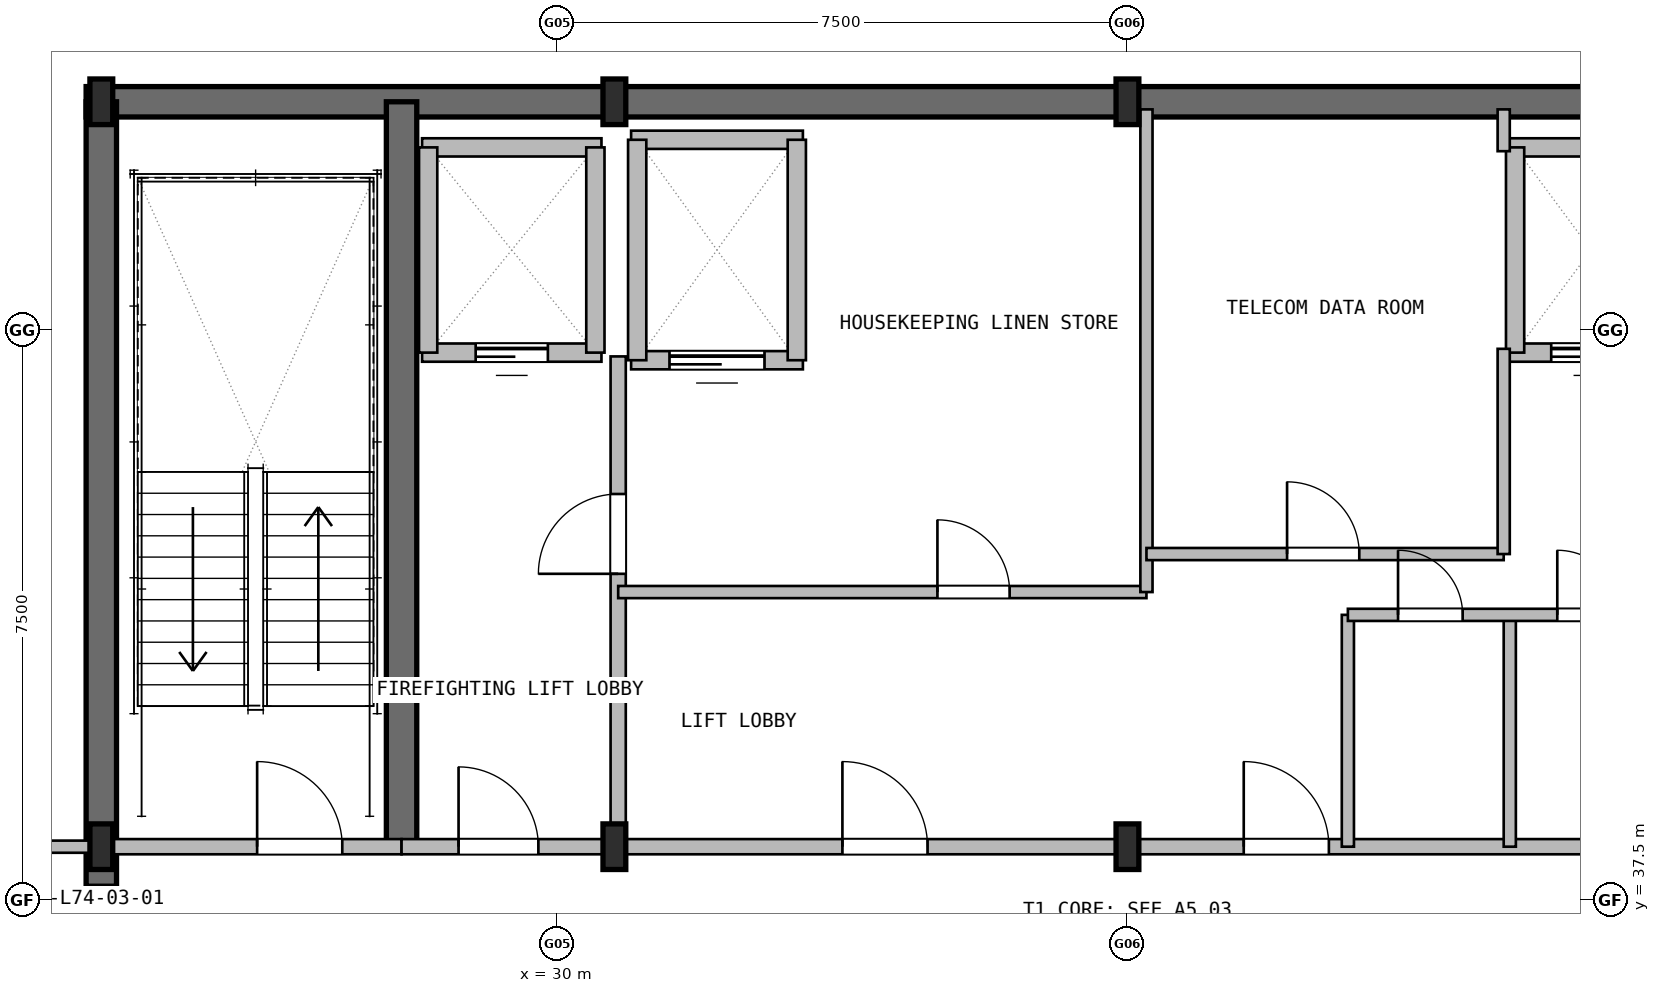
"""IFC4 building model, lengths in metres.
Left out: names, types, materials, properties, quantities, classifications, styles, units other than length and angle.
Written with IfcOpenShell. Run it as: python <this file> out.ifc"""

import sys

from ifc_helpers import new_model, si_unit, direction, frame, frame_2d, origin, origin_2d, place, context, subcontext, project, spatial, rectangle, i_section, extrude, element, fill, save


model = new_model("IFC4")
c1 = context("Model", 3, precision=1e-05, world=origin(), true_north=direction((0.0, 1.0)))
c2 = subcontext(c1, "Body", "Model", "MODEL_VIEW")
j1 = project(units=[si_unit("LENGTHUNIT", "METRE"), si_unit("PLANEANGLEUNIT", "RADIAN")], contexts=[c1])
p1 = place(None, origin())
s1 = spatial("IfcSite", under=j1, at=p1, CompositionType="ELEMENT")
p2 = place(p1, origin())
s2 = spatial("IfcBuilding", under=s1, at=p2, CompositionType="ELEMENT")
p3 = place(p2, frame((0.0, 0.0, 265.8)))
s3 = spatial("IfcBuildingStorey", under=s2, at=p3, CompositionType="ELEMENT", Elevation=265.8)
p4 = place(p3, frame((23.8, 48.0, 0.0), z_axis=(0.0, 0.0, 1.0), x_axis=(1.0, 0.0, 0.0)))
e1 = element("IfcWall", 1, at=p4, inside=s3, PredefinedType="SHEAR", context=c2, shape_type="SweptSolid", body=[
    extrude(rectangle(XDim=27.4, YDim=0.4, at=frame_2d((13.7, 0.0))), origin(), (0.0, 0.0, 1.0), 4.2),
])
p5 = place(p3, frame((24.0, 37.68, 0.0), z_axis=(0.0, 0.0, 1.0), x_axis=(0.0, 1.0, 0.0)))
e2 = element("IfcWall", 2, at=p5, inside=s3, PredefinedType="SHEAR", context=c2, shape_type="SweptSolid", body=[
    extrude(rectangle(XDim=10.32, YDim=0.4, at=frame_2d((5.16, 0.0))), origin(), (0.0, 0.0, 1.0), 4.2),
])
p6 = place(p3, frame((27.95, 38.2, 0.0), z_axis=(0.0, 0.0, 1.0), x_axis=(0.0, 1.0, 0.0)))
e3 = element("IfcWall", 3, at=p6, inside=s3, PredefinedType="SHEAR", context=c2, shape_type="SweptSolid", body=[
    extrude(rectangle(XDim=9.8, YDim=0.4, at=frame_2d((4.9, 0.0))), origin(), (0.0, 0.0, 1.0), 4.2),
])
for number, where, z_axis, x_axis in (
    (4, (24.0, 38.2, 0.0), (0.0, 0.0, 1.0), (1.0, 0.0, 0.0)),
    (5, (24.0, 48.0, 0.0), (0.0, 0.0, 1.0), (1.0, 0.0, 0.0)),
    (6, (30.75, 38.2, 0.0), (0.0, 0.0, 1.0), (1.0, 0.0, 0.0)),
    (7, (30.75, 48.0, 0.0), (0.0, 0.0, 1.0), (1.0, 0.0, 0.0)),
    (8, (37.5, 38.2, 0.0), (0.0, 0.0, 1.0), (1.0, 0.0, 0.0)),
    (9, (37.5, 48.0, 0.0), (0.0, 0.0, 1.0), (1.0, 0.0, 0.0)),
):
    element("IfcColumn", number, at=place(p3, frame(where, z_axis=z_axis, x_axis=x_axis)), inside=s3, PredefinedType="COLUMN", context=c2, shape_type="SweptSolid", body=[
        extrude(i_section(OverallWidth=0.3, OverallDepth=0.6, WebThickness=0.014, FlangeThickness=0.025, at=origin_2d()), origin(), (0.0, 0.0, 1.0), 4.2),
    ])
p7 = place(p3, frame((24.0, 38.2, 0.0), z_axis=(0.0, 0.0, 1.0), x_axis=(1.0, 0.0, 0.0)))
e10 = element("IfcWall", 10, at=p7, inside=s3, PredefinedType="PARTITIONING", context=c2, shape_type="SweptSolid", body=[
    extrude(rectangle(XDim=3.95, YDim=0.2, at=frame_2d((1.975, 0.0))), origin(), (0.0, 0.0, 1.0), 3.33),
])
p8 = place(p7, frame((2.05, 0.0, 0.0)))
e11 = element("IfcOpeningElement", 11, at=p8, cuts=e10, PredefinedType="OPENING", context=c2, shape_type="SweptSolid", body=[
    extrude(rectangle(XDim=1.12, YDim=2.1, at=frame_2d((0.56, 1.05))), frame((0.0, 0.11, 0.0), z_axis=(0.0, -1.0, 0.0), x_axis=(1.0, 0.0, 0.0)), (0.0, 0.0, 1.0), 0.22),
])
p9 = place(p3, frame((30.8, 38.2, 0.0), z_axis=(0.0, 0.0, 1.0), x_axis=(0.0, 1.0, 0.0)))
e12 = element("IfcWall", 12, at=p9, inside=s3, PredefinedType="PARTITIONING", context=c2, shape_type="SweptSolid", body=[
    extrude(rectangle(XDim=6.45, YDim=0.2, at=frame_2d((3.225, 0.0))), origin(), (0.0, 0.0, 1.0), 3.33),
])
p10 = place(p9, frame((3.59, 0.0, 0.0)))
e13 = element("IfcOpeningElement", 13, at=p10, cuts=e12, PredefinedType="OPENING", context=c2, shape_type="SweptSolid", body=[
    extrude(rectangle(XDim=1.05, YDim=2.1, at=frame_2d((0.525, 1.05))), frame((0.0, 0.11, 0.0), z_axis=(0.0, -1.0, 0.0), x_axis=(1.0, 0.0, 0.0)), (0.0, 0.0, 1.0), 0.22),
])
p11 = place(p3, frame((27.95, 38.2, 0.0), z_axis=(0.0, 0.0, 1.0), x_axis=(1.0, 0.0, 0.0)))
e14 = element("IfcWall", 14, at=p11, inside=s3, PredefinedType="PARTITIONING", context=c2, shape_type="SweptSolid", body=[
    extrude(rectangle(XDim=2.85, YDim=0.2, at=frame_2d((1.425, 0.0))), origin(), (0.0, 0.0, 1.0), 3.33),
])
p12 = place(p11, frame((0.75, 0.0, 0.0)))
e15 = element("IfcOpeningElement", 15, at=p12, cuts=e14, PredefinedType="OPENING", context=c2, shape_type="SweptSolid", body=[
    extrude(rectangle(XDim=1.05, YDim=2.1, at=frame_2d((0.525, 1.05))), frame((0.0, 0.11, 0.0), z_axis=(0.0, -1.0, 0.0), x_axis=(1.0, 0.0, 0.0)), (0.0, 0.0, 1.0), 0.22),
])
p13 = place(p3, frame((30.8, 38.2, 0.0), z_axis=(0.0, 0.0, 1.0), x_axis=(1.0, 0.0, 0.0)))
e16 = element("IfcWall", 16, at=p13, inside=s3, PredefinedType="PARTITIONING", context=c2, shape_type="SweptSolid", body=[
    extrude(rectangle(XDim=16.35, YDim=0.2, at=frame_2d((8.175, 0.0))), origin(), (0.0, 0.0, 1.0), 3.33),
])
p14 = place(p13, frame((2.95, 0.0, 0.0)))
e17 = element("IfcOpeningElement", 17, at=p14, cuts=e16, PredefinedType="OPENING", context=c2, shape_type="SweptSolid", body=[
    extrude(rectangle(XDim=1.12, YDim=2.1, at=frame_2d((0.56, 1.05))), frame((0.0, 0.11, 0.0), z_axis=(0.0, -1.0, 0.0), x_axis=(1.0, 0.0, 0.0)), (0.0, 0.0, 1.0), 0.22),
])
p15 = place(p13, frame((8.23, 0.0, 0.0)))
e18 = element("IfcOpeningElement", 18, at=p15, cuts=e16, PredefinedType="OPENING", context=c2, shape_type="SweptSolid", body=[
    extrude(rectangle(XDim=1.12, YDim=2.1, at=frame_2d((0.56, 1.05))), frame((0.0, 0.11, 0.0), z_axis=(0.0, -1.0, 0.0), x_axis=(1.0, 0.0, 0.0)), (0.0, 0.0, 1.0), 0.22),
])
p16 = place(p3, frame((28.22, 44.7, 0.0), z_axis=(0.0, 0.0, 1.0), x_axis=(1.0, 0.0, 0.0)))
e19 = element("IfcWall", 19, at=p16, inside=s3, PredefinedType="PARTITIONING", context=c2, shape_type="SweptSolid", body=[
    extrude(rectangle(XDim=2.36, YDim=0.24, at=frame_2d((1.18, 0.0))), origin(), (0.0, 0.0, 1.0), 3.93),
])
p17 = place(p16, frame((0.705, 0.0, 0.0)))
e20 = element("IfcOpeningElement", 20, at=p17, cuts=e19, PredefinedType="OPENING", context=c2, shape_type="SweptSolid", body=[
    extrude(rectangle(XDim=0.95, YDim=2.15, at=frame_2d((0.475, 1.075))), frame((0.0, 0.13, 0.0), z_axis=(0.0, -1.0, 0.0), x_axis=(1.0, 0.0, 0.0)), (0.0, 0.0, 1.0), 0.26),
])
p18 = place(p3, frame((28.22, 47.4, 0.0), z_axis=(0.0, 0.0, 1.0), x_axis=(1.0, 0.0, 0.0)))
e21 = element("IfcWall", 21, at=p18, inside=s3, PredefinedType="PARTITIONING", context=c2, shape_type="SweptSolid", body=[
    extrude(rectangle(XDim=2.36, YDim=0.24, at=frame_2d((1.18, 0.0))), origin(), (0.0, 0.0, 1.0), 3.93),
])
p19 = place(p3, frame((28.3, 44.7, 0.0), z_axis=(0.0, 0.0, 1.0), x_axis=(0.0, 1.0, 0.0)))
e22 = element("IfcWall", 22, at=p19, inside=s3, PredefinedType="PARTITIONING", context=c2, shape_type="SweptSolid", body=[
    extrude(rectangle(XDim=2.7, YDim=0.24, at=frame_2d((1.35, 0.0))), origin(), (0.0, 0.0, 1.0), 3.93),
])
p20 = place(p3, frame((30.5, 44.7, 0.0), z_axis=(0.0, 0.0, 1.0), x_axis=(0.0, 1.0, 0.0)))
e23 = element("IfcWall", 23, at=p20, inside=s3, PredefinedType="PARTITIONING", context=c2, shape_type="SweptSolid", body=[
    extrude(rectangle(XDim=2.7, YDim=0.24, at=frame_2d((1.35, 0.0))), origin(), (0.0, 0.0, 1.0), 3.33),
])
p21 = place(p3, frame((30.97, 44.6, 0.0), z_axis=(0.0, 0.0, 1.0), x_axis=(1.0, 0.0, 0.0)))
e24 = element("IfcWall", 24, at=p21, inside=s3, PredefinedType="PARTITIONING", context=c2, shape_type="SweptSolid", body=[
    extrude(rectangle(XDim=2.26, YDim=0.24, at=frame_2d((1.13, 0.0))), origin(), (0.0, 0.0, 1.0), 3.93),
])
p22 = place(p21, frame((0.505, 0.0, 0.0)))
e25 = element("IfcOpeningElement", 25, at=p22, cuts=e24, PredefinedType="OPENING", context=c2, shape_type="SweptSolid", body=[
    extrude(rectangle(XDim=1.25, YDim=2.2, at=frame_2d((0.625, 1.1))), frame((0.0, 0.13, 0.0), z_axis=(0.0, -1.0, 0.0), x_axis=(1.0, 0.0, 0.0)), (0.0, 0.0, 1.0), 0.26),
])
p23 = place(p3, frame((30.97, 47.5, 0.0), z_axis=(0.0, 0.0, 1.0), x_axis=(1.0, 0.0, 0.0)))
e26 = element("IfcWall", 26, at=p23, inside=s3, PredefinedType="PARTITIONING", context=c2, shape_type="SweptSolid", body=[
    extrude(rectangle(XDim=2.26, YDim=0.24, at=frame_2d((1.13, 0.0))), origin(), (0.0, 0.0, 1.0), 3.93),
])
for number, where, z_axis, x_axis in (
    (27, (31.05, 44.6, 0.0), (0.0, 0.0, 1.0), (0.0, 1.0, 0.0)),
    (28, (33.15, 44.6, 0.0), (0.0, 0.0, 1.0), (0.0, 1.0, 0.0)),
):
    element("IfcWall", number, at=place(p3, frame(where, z_axis=z_axis, x_axis=x_axis)), inside=s3, PredefinedType="PARTITIONING", context=c2, shape_type="SweptSolid", body=[
        extrude(rectangle(XDim=2.9, YDim=0.24, at=frame_2d((1.45, 0.0))), origin(), (0.0, 0.0, 1.0), 3.93),
    ])
p24 = place(p3, frame((42.52, 44.7, 0.0), z_axis=(0.0, 0.0, 1.0), x_axis=(1.0, 0.0, 0.0)))
e29 = element("IfcWall", 29, at=p24, inside=s3, PredefinedType="PARTITIONING", context=c2, shape_type="SweptSolid", body=[
    extrude(rectangle(XDim=2.16, YDim=0.24, at=frame_2d((1.08, 0.0))), origin(), (0.0, 0.0, 1.0), 3.93),
])
p25 = place(p24, frame((0.555, 0.0, 0.0)))
e30 = element("IfcOpeningElement", 30, at=p25, cuts=e29, PredefinedType="OPENING", context=c2, shape_type="SweptSolid", body=[
    extrude(rectangle(XDim=1.05, YDim=2.15, at=frame_2d((0.525, 1.075))), frame((0.0, 0.13, 0.0), z_axis=(0.0, -1.0, 0.0), x_axis=(1.0, 0.0, 0.0)), (0.0, 0.0, 1.0), 0.26),
])
p26 = place(p3, frame((42.52, 47.4, 0.0), z_axis=(0.0, 0.0, 1.0), x_axis=(1.0, 0.0, 0.0)))
e31 = element("IfcWall", 31, at=p26, inside=s3, PredefinedType="PARTITIONING", context=c2, shape_type="SweptSolid", body=[
    extrude(rectangle(XDim=2.16, YDim=0.24, at=frame_2d((1.08, 0.0))), origin(), (0.0, 0.0, 1.0), 3.93),
])
p27 = place(p3, frame((42.6, 44.7, 0.0), z_axis=(0.0, 0.0, 1.0), x_axis=(0.0, 1.0, 0.0)))
e32 = element("IfcWall", 32, at=p27, inside=s3, PredefinedType="PARTITIONING", context=c2, shape_type="SweptSolid", body=[
    extrude(rectangle(XDim=2.7, YDim=0.24, at=frame_2d((1.35, 0.0))), origin(), (0.0, 0.0, 1.0), 3.93),
])
p28 = place(p3, frame((30.8, 41.55, 0.0), z_axis=(0.0, 0.0, 1.0), x_axis=(1.0, 0.0, 0.0)))
e33 = element("IfcWall", 33, at=p28, inside=s3, PredefinedType="PARTITIONING", context=c2, shape_type="SweptSolid", body=[
    extrude(rectangle(XDim=6.95, YDim=0.16, at=frame_2d((3.475, 0.0))), origin(), (0.0, 0.0, 1.0), 3.93),
])
p29 = place(p28, frame((4.2, 0.0, 0.0)))
e34 = element("IfcOpeningElement", 34, at=p29, cuts=e33, PredefinedType="OPENING", context=c2, shape_type="SweptSolid", body=[
    extrude(rectangle(XDim=0.95, YDim=2.1, at=frame_2d((0.475, 1.05))), frame((0.0, 0.09, 0.0), z_axis=(0.0, -1.0, 0.0), x_axis=(1.0, 0.0, 0.0)), (0.0, 0.0, 1.0), 0.18),
])
p30 = place(p3, frame((37.75, 41.55, 0.0), z_axis=(0.0, 0.0, 1.0), x_axis=(0.0, 1.0, 0.0)))
e35 = element("IfcWall", 35, at=p30, inside=s3, PredefinedType="PARTITIONING", context=c2, shape_type="SweptSolid", body=[
    extrude(rectangle(XDim=6.35, YDim=0.16, at=frame_2d((3.175, 0.0))), origin(), (0.0, 0.0, 1.0), 3.93),
])
p31 = place(p3, frame((37.75, 42.05, 0.0), z_axis=(0.0, 0.0, 1.0), x_axis=(1.0, 0.0, 0.0)))
e36 = element("IfcWall", 36, at=p31, inside=s3, PredefinedType="PARTITIONING", context=c2, shape_type="SweptSolid", body=[
    extrude(rectangle(XDim=4.7, YDim=0.16, at=frame_2d((2.35, 0.0))), origin(), (0.0, 0.0, 1.0), 3.93),
])
p32 = place(p31, frame((1.85, 0.0, 0.0)))
e37 = element("IfcOpeningElement", 37, at=p32, cuts=e36, PredefinedType="OPENING", context=c2, shape_type="SweptSolid", body=[
    extrude(rectangle(XDim=0.95, YDim=2.1, at=frame_2d((0.475, 1.05))), frame((0.0, 0.09, 0.0), z_axis=(0.0, -1.0, 0.0), x_axis=(1.0, 0.0, 0.0)), (0.0, 0.0, 1.0), 0.18),
])
p33 = place(p3, frame((42.45, 42.05, 0.0), z_axis=(0.0, 0.0, 1.0), x_axis=(0.0, 1.0, 0.0)))
e38 = element("IfcWall", 38, at=p33, inside=s3, PredefinedType="PARTITIONING", context=c2, shape_type="SweptSolid", body=[
    extrude(rectangle(XDim=2.7, YDim=0.16, at=frame_2d((1.35, 0.0))), origin(), (0.0, 0.0, 1.0), 3.93),
])
p34 = place(p3, frame((42.45, 47.35, 0.0), z_axis=(0.0, 0.0, 1.0), x_axis=(0.0, 1.0, 0.0)))
e39 = element("IfcWall", 39, at=p34, inside=s3, PredefinedType="PARTITIONING", context=c2, shape_type="SweptSolid", body=[
    extrude(rectangle(XDim=0.55, YDim=0.16, at=frame_2d((0.275, 0.0))), origin(), (0.0, 0.0, 1.0), 3.93),
])
for number, where, z_axis, x_axis in (
    (40, (40.4, 38.2, 0.0), (0.0, 0.0, 1.0), (0.0, 1.0, 0.0)),
    (41, (42.53, 38.2, 0.0), (0.0, 0.0, 1.0), (0.0, 1.0, 0.0)),
):
    element("IfcWall", number, at=place(p3, frame(where, z_axis=z_axis, x_axis=x_axis)), inside=s3, PredefinedType="PARTITIONING", context=c2, shape_type="SweptSolid", body=[
        extrude(rectangle(XDim=3.05, YDim=0.16, at=frame_2d((1.525, 0.0))), origin(), (0.0, 0.0, 1.0), 3.93),
    ])
p35 = place(p3, frame((40.4, 41.25, 0.0), z_axis=(0.0, 0.0, 1.0), x_axis=(1.0, 0.0, 0.0)))
e42 = element("IfcWall", 42, at=p35, inside=s3, PredefinedType="PARTITIONING", context=c2, shape_type="SweptSolid", body=[
    extrude(rectangle(XDim=6.75, YDim=0.16, at=frame_2d((3.375, 0.0))), origin(), (0.0, 0.0, 1.0), 3.93),
])
p36 = place(p35, frame((0.66, 0.0, 0.0)))
e43 = element("IfcOpeningElement", 43, at=p36, cuts=e42, PredefinedType="OPENING", context=c2, shape_type="SweptSolid", body=[
    extrude(rectangle(XDim=0.85, YDim=2.05, at=frame_2d((0.425, 1.025))), frame((0.0, 0.09, 0.0), z_axis=(0.0, -1.0, 0.0), x_axis=(1.0, 0.0, 0.0)), (0.0, 0.0, 1.0), 0.18),
])
p37 = place(p35, frame((2.755, 0.0, 0.0)))
e44 = element("IfcOpeningElement", 44, at=p37, cuts=e42, PredefinedType="OPENING", context=c2, shape_type="SweptSolid", body=[
    extrude(rectangle(XDim=0.85, YDim=2.05, at=frame_2d((0.425, 1.025))), frame((0.0, 0.09, 0.0), z_axis=(0.0, -1.0, 0.0), x_axis=(1.0, 0.0, 0.0)), (0.0, 0.0, 1.0), 0.18),
])
p38 = place(p35, frame((4.83, 0.0, 0.0)))
e45 = element("IfcOpeningElement", 45, at=p38, cuts=e42, PredefinedType="OPENING", context=c2, shape_type="SweptSolid", body=[
    extrude(rectangle(XDim=0.85, YDim=2.05, at=frame_2d((0.425, 1.025))), frame((0.0, 0.09, 0.0), z_axis=(0.0, -1.0, 0.0), x_axis=(1.0, 0.0, 0.0)), (0.0, 0.0, 1.0), 0.18),
])
p39 = place(p3, frame((22.6, 38.2, 0.0), z_axis=(0.0, 0.0, 1.0), x_axis=(1.0, 0.0, 0.0)))
e46 = element("IfcWall", 46, at=p39, inside=s3, PredefinedType="PARTITIONING", context=c2, shape_type="SweptSolid", body=[
    extrude(rectangle(XDim=1.4, YDim=0.16, at=frame_2d((0.7, 0.0))), origin(), (0.0, 0.0, 1.0), 3.33),
])
p40 = place(p8, origin())
e47 = element("IfcDoor", 47, at=p40, inside=s3, OperationType="SINGLE_SWING_RIGHT", PredefinedType="DOOR", context=c2, shape_type="SweptSolid", body=[
    extrude(rectangle(XDim=1.12, YDim=2.1, at=frame_2d((0.56, 1.05))), frame((0.0, 0.025, 0.0), z_axis=(0.0, -1.0, 0.0), x_axis=(1.0, 0.0, 0.0)), (0.0, 0.0, 1.0), 0.05),
])
fill(e11, e47)
p41 = place(p10, origin())
e48 = element("IfcDoor", 48, at=p41, inside=s3, OperationType="SINGLE_SWING_RIGHT", PredefinedType="DOOR", context=c2, shape_type="SweptSolid", body=[
    extrude(rectangle(XDim=1.05, YDim=2.1, at=frame_2d((0.525, 1.05))), frame((0.0, 0.025, 0.0), z_axis=(0.0, -1.0, 0.0), x_axis=(1.0, 0.0, 0.0)), (0.0, 0.0, 1.0), 0.05),
])
fill(e13, e48)
p42 = place(p12, origin())
e49 = element("IfcDoor", 49, at=p42, inside=s3, OperationType="SINGLE_SWING_LEFT", PredefinedType="DOOR", context=c2, shape_type="SweptSolid", body=[
    extrude(rectangle(XDim=1.05, YDim=2.1, at=frame_2d((0.525, 1.05))), frame((0.0, 0.025, 0.0), z_axis=(0.0, -1.0, 0.0), x_axis=(1.0, 0.0, 0.0)), (0.0, 0.0, 1.0), 0.05),
])
fill(e15, e49)
p43 = place(p14, origin())
e50 = element("IfcDoor", 50, at=p43, inside=s3, OperationType="SINGLE_SWING_RIGHT", PredefinedType="DOOR", context=c2, shape_type="SweptSolid", body=[
    extrude(rectangle(XDim=1.12, YDim=2.1, at=frame_2d((0.56, 1.05))), frame((0.0, 0.025, 0.0), z_axis=(0.0, -1.0, 0.0), x_axis=(1.0, 0.0, 0.0)), (0.0, 0.0, 1.0), 0.05),
])
fill(e17, e50)
p44 = place(p15, origin())
e51 = element("IfcDoor", 51, at=p44, inside=s3, OperationType="SINGLE_SWING_LEFT", PredefinedType="DOOR", context=c2, shape_type="SweptSolid", body=[
    extrude(rectangle(XDim=1.12, YDim=2.1, at=frame_2d((0.56, 1.05))), frame((0.0, 0.025, 0.0), z_axis=(0.0, -1.0, 0.0), x_axis=(1.0, 0.0, 0.0)), (0.0, 0.0, 1.0), 0.05),
])
fill(e18, e51)
p45 = place(p17, origin())
e52 = element("IfcDoor", 52, at=p45, inside=s3, OperationType="SLIDING_TO_LEFT", PredefinedType="DOOR", context=c2, shape_type="SweptSolid", body=[
    extrude(rectangle(XDim=0.95, YDim=2.15, at=frame_2d((0.475, 1.075))), frame((0.0, 0.025, 0.0), z_axis=(0.0, -1.0, 0.0), x_axis=(1.0, 0.0, 0.0)), (0.0, 0.0, 1.0), 0.05),
])
fill(e20, e52)
p46 = place(p22, origin())
e53 = element("IfcDoor", 53, at=p46, inside=s3, OperationType="SLIDING_TO_LEFT", PredefinedType="DOOR", context=c2, shape_type="SweptSolid", body=[
    extrude(rectangle(XDim=1.25, YDim=2.2, at=frame_2d((0.625, 1.1))), frame((0.0, 0.025, 0.0), z_axis=(0.0, -1.0, 0.0), x_axis=(1.0, 0.0, 0.0)), (0.0, 0.0, 1.0), 0.05),
])
fill(e25, e53)
p47 = place(p25, origin())
e54 = element("IfcDoor", 54, at=p47, inside=s3, OperationType="SLIDING_TO_LEFT", PredefinedType="DOOR", context=c2, shape_type="SweptSolid", body=[
    extrude(rectangle(XDim=1.05, YDim=2.15, at=frame_2d((0.525, 1.075))), frame((0.0, 0.025, 0.0), z_axis=(0.0, -1.0, 0.0), x_axis=(1.0, 0.0, 0.0)), (0.0, 0.0, 1.0), 0.05),
])
fill(e30, e54)
p48 = place(p29, origin())
e55 = element("IfcDoor", 55, at=p48, inside=s3, OperationType="SINGLE_SWING_LEFT", PredefinedType="DOOR", context=c2, shape_type="SweptSolid", body=[
    extrude(rectangle(XDim=0.95, YDim=2.1, at=frame_2d((0.475, 1.05))), frame((0.0, 0.025, 0.0), z_axis=(0.0, -1.0, 0.0), x_axis=(1.0, 0.0, 0.0)), (0.0, 0.0, 1.0), 0.05),
])
fill(e34, e55)
p49 = place(p32, origin())
e56 = element("IfcDoor", 56, at=p49, inside=s3, OperationType="SINGLE_SWING_RIGHT", PredefinedType="DOOR", context=c2, shape_type="SweptSolid", body=[
    extrude(rectangle(XDim=0.95, YDim=2.1, at=frame_2d((0.475, 1.05))), frame((0.0, 0.025, 0.0), z_axis=(0.0, -1.0, 0.0), x_axis=(1.0, 0.0, 0.0)), (0.0, 0.0, 1.0), 0.05),
])
fill(e37, e56)
p50 = place(p36, origin())
e57 = element("IfcDoor", 57, at=p50, inside=s3, OperationType="SINGLE_SWING_LEFT", PredefinedType="DOOR", context=c2, shape_type="SweptSolid", body=[
    extrude(rectangle(XDim=0.85, YDim=2.05, at=frame_2d((0.425, 1.025))), frame((0.0, 0.025, 0.0), z_axis=(0.0, -1.0, 0.0), x_axis=(1.0, 0.0, 0.0)), (0.0, 0.0, 1.0), 0.05),
])
fill(e43, e57)
p51 = place(p37, origin())
e58 = element("IfcDoor", 58, at=p51, inside=s3, OperationType="SINGLE_SWING_RIGHT", PredefinedType="DOOR", context=c2, shape_type="SweptSolid", body=[
    extrude(rectangle(XDim=0.85, YDim=2.05, at=frame_2d((0.425, 1.025))), frame((0.0, 0.025, 0.0), z_axis=(0.0, -1.0, 0.0), x_axis=(1.0, 0.0, 0.0)), (0.0, 0.0, 1.0), 0.05),
])
fill(e44, e58)
save(model, sys.argv[1])
